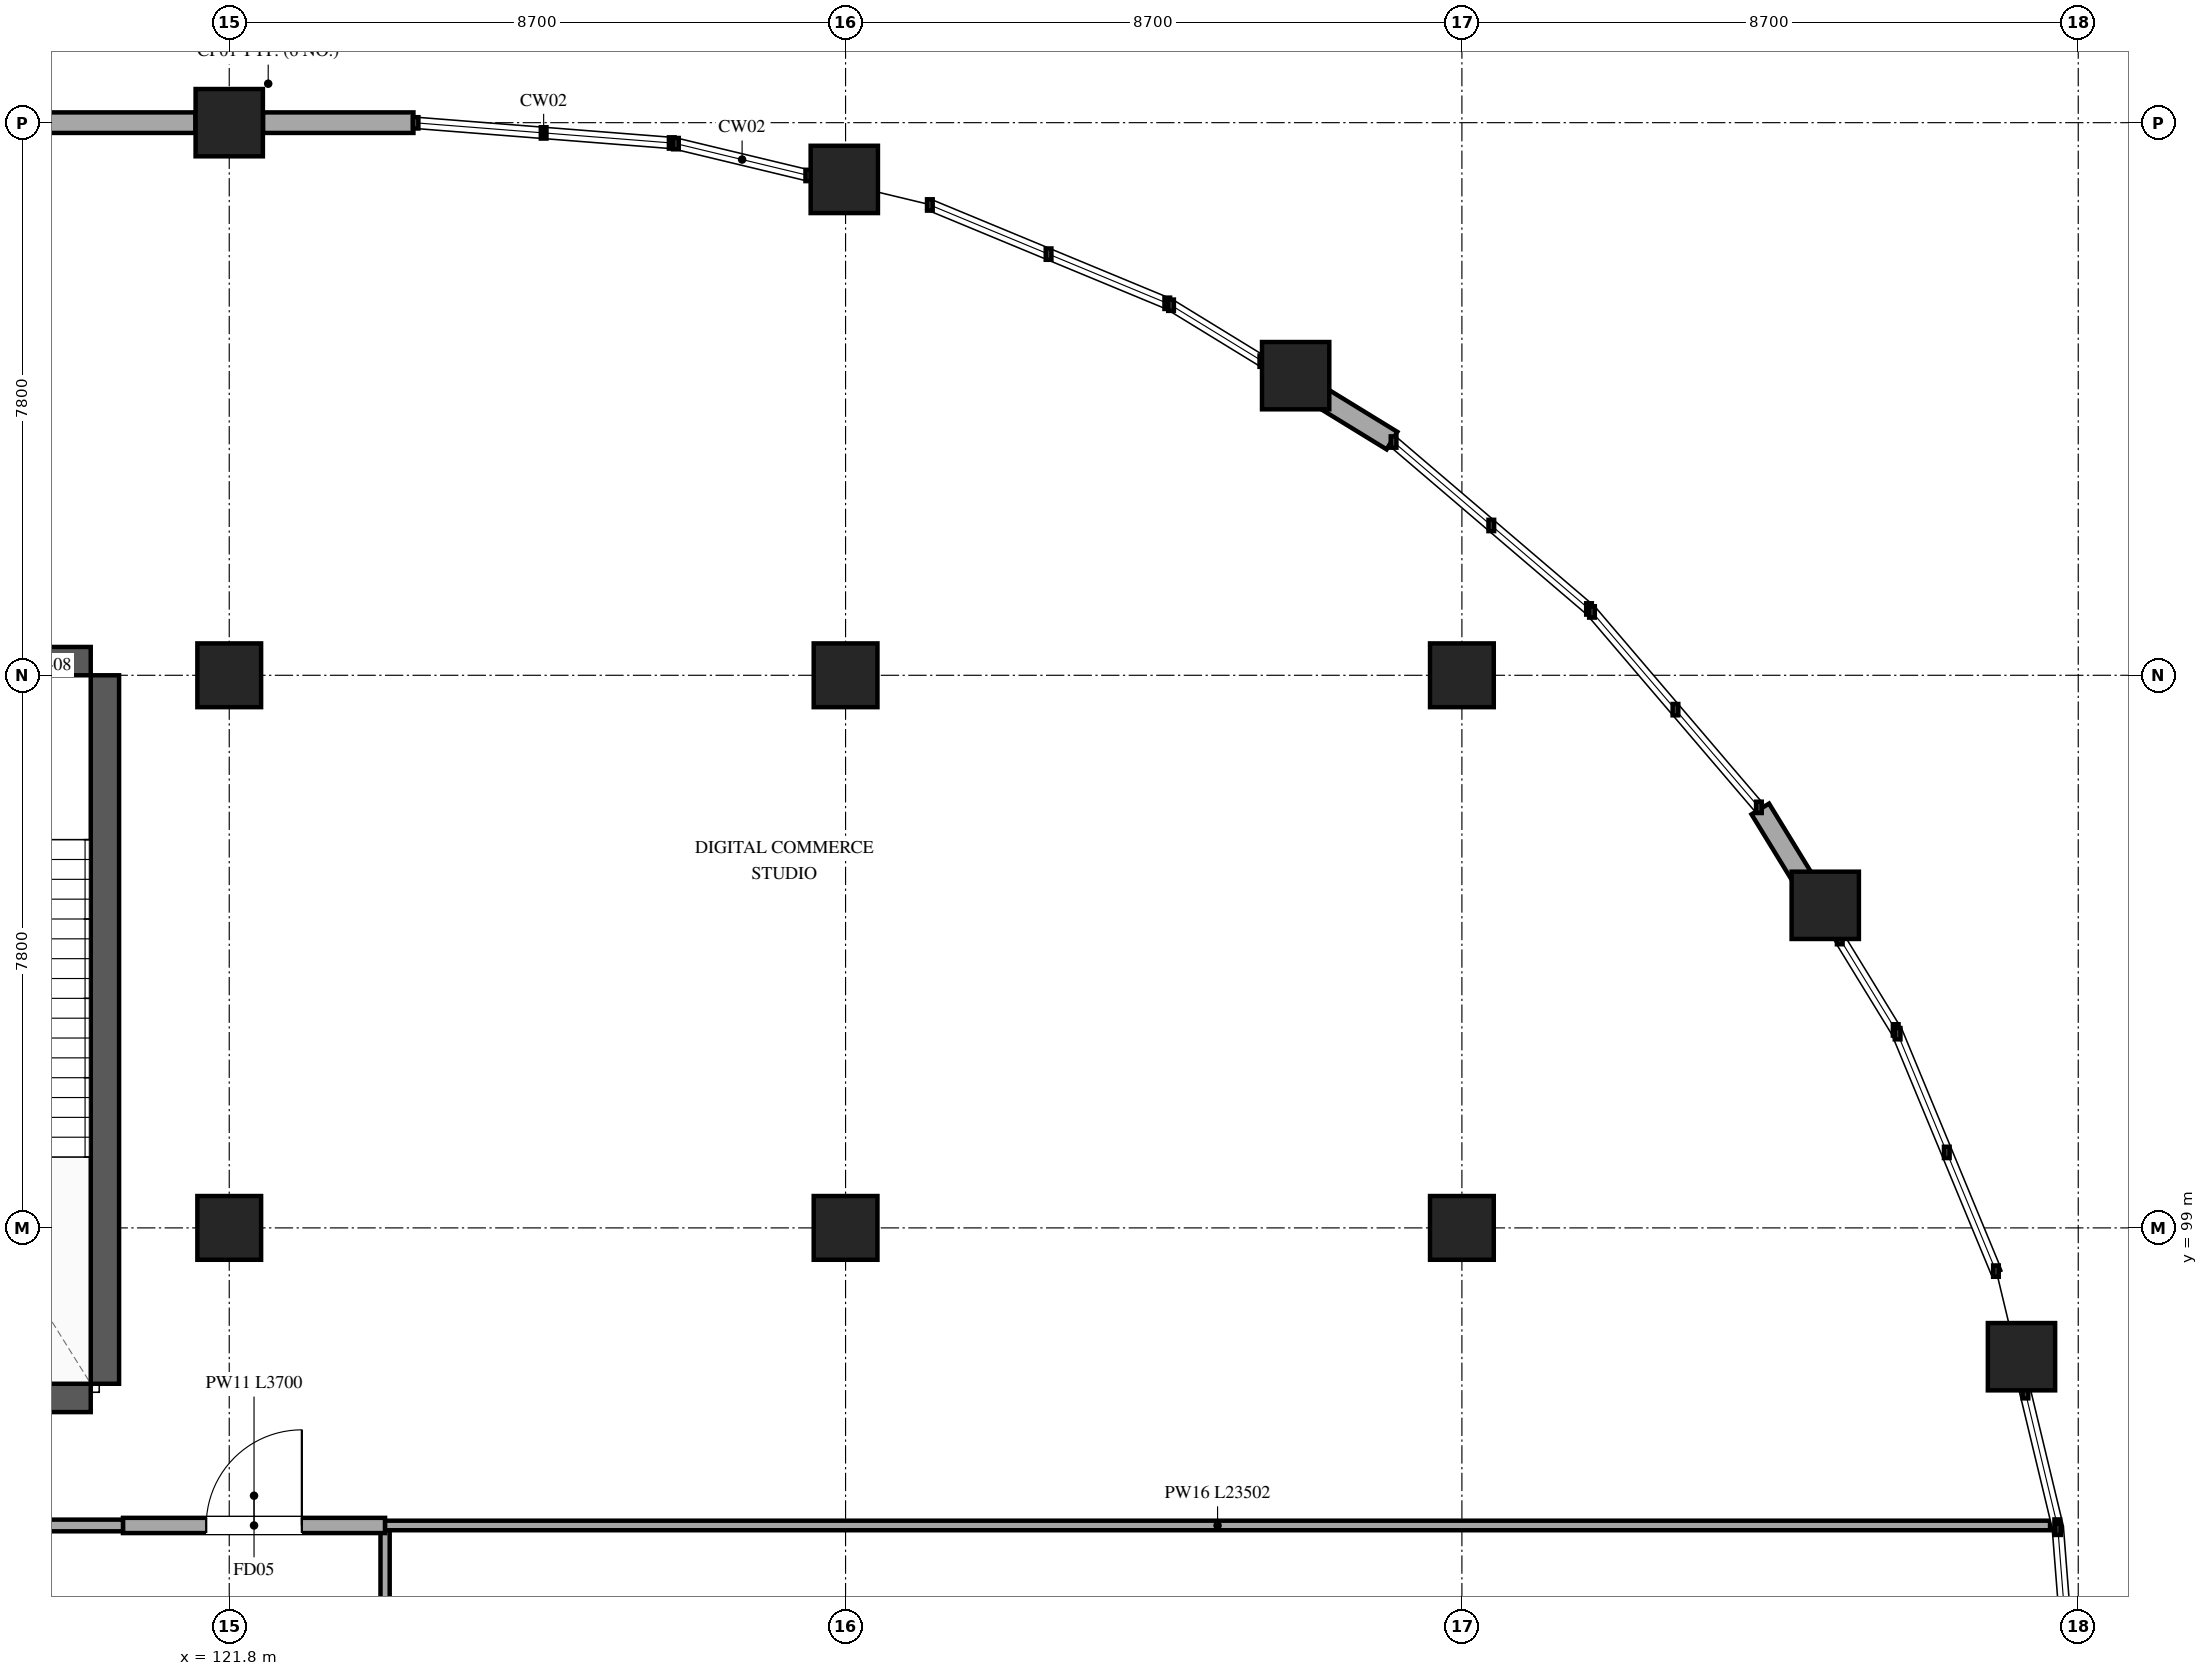
"""IFC4 building model, lengths in metres.
Left out: names, types, materials, properties, quantities, classifications, styles, units other than length and angle.
Written with IfcOpenShell. Run it as: python <this file> out.ifc"""

import sys

from ifc_helpers import new_model, si_unit, direction, frame, frame_2d, origin, origin_2d, place, context, subcontext, project, spatial, rectangle, circle, extrude, element, fill, save


model = new_model("IFC4")
c1 = context("Model", 3, precision=1e-05, world=origin(), true_north=direction((0.0, 1.0)))
c2 = subcontext(c1, "Body", "Model", "MODEL_VIEW")
j1 = project(units=[si_unit("LENGTHUNIT", "METRE"), si_unit("PLANEANGLEUNIT", "RADIAN")], contexts=[c1])
p1 = place(None, origin())
s1 = spatial("IfcSite", under=j1, at=p1, CompositionType="ELEMENT")
p2 = place(p1, origin())
s2 = spatial("IfcBuilding", under=s1, at=p2, CompositionType="ELEMENT")
p3 = place(p2, frame((0.0, 0.0, 11.4)))
s3 = spatial("IfcBuildingStorey", under=s2, at=p3, CompositionType="ELEMENT", Elevation=11.4)
for number, where, z_axis, x_axis in (
    (1, (121.8, 99.0, 0.0), (0.0, 0.0, 1.0), (1.0, 0.0, 0.0)),
    (2, (121.8, 106.8, 0.0), (0.0, 0.0, 1.0), (1.0, 0.0, 0.0)),
):
    element("IfcColumn", number, at=place(p3, frame(where, z_axis=z_axis, x_axis=x_axis)), inside=s3, PredefinedType="COLUMN", context=c2, shape_type="SweptSolid", body=[
        extrude(rectangle(XDim=0.9, YDim=0.9, at=origin_2d()), origin(), (0.0, 0.0, 1.0), 5.1),
    ])
p4 = place(p3, frame((121.8, 114.6, 0.0), z_axis=(0.0, 0.0, 1.0), x_axis=(1.0, 0.0, 0.0)))
e3 = element("IfcColumn", 3, at=p4, inside=s3, PredefinedType="PILASTER", context=c2, shape_type="SweptSolid", body=[
    extrude(circle(Radius=0.475, at=origin_2d()), origin(), (0.0, 0.0, 1.0), 5.1),
])
for number, where, z_axis, x_axis in (
    (4, (130.5, 99.0, 0.0), (0.0, 0.0, 1.0), (1.0, 0.0, 0.0)),
    (5, (130.5, 106.8, 0.0), (0.0, 0.0, 1.0), (1.0, 0.0, 0.0)),
    (6, (139.2, 99.0, 0.0), (0.0, 0.0, 1.0), (1.0, 0.0, 0.0)),
    (7, (139.2, 106.8, 0.0), (0.0, 0.0, 1.0), (1.0, 0.0, 0.0)),
):
    element("IfcColumn", number, at=place(p3, frame(where, z_axis=z_axis, x_axis=x_axis)), inside=s3, PredefinedType="COLUMN", context=c2, shape_type="SweptSolid", body=[
        extrude(rectangle(XDim=0.9, YDim=0.9, at=origin_2d()), origin(), (0.0, 0.0, 1.0), 5.1),
    ])
for number, where, z_axis, x_axis in (
    (8, (147.099, 97.182, 0.0), (0.0, 0.0, 1.0), (1.0, 0.0, 0.0)),
    (9, (144.329, 103.553, 0.0), (0.0, 0.0, 1.0), (1.0, 0.0, 0.0)),
    (10, (136.853, 111.029, 0.0), (0.0, 0.0, 1.0), (1.0, 0.0, 0.0)),
    (11, (130.482, 113.799, 0.0), (0.0, 0.0, 1.0), (1.0, 0.0, 0.0)),
):
    element("IfcColumn", number, at=place(p3, frame(where, z_axis=z_axis, x_axis=x_axis)), inside=s3, PredefinedType="PILASTER", context=c2, shape_type="SweptSolid", body=[
        extrude(circle(Radius=0.475, at=origin_2d()), origin(), (0.0, 0.0, 1.0), 5.1),
    ])
p5 = place(p3, frame((113.577, 114.6, 0.0), z_axis=(0.0, 0.0, 1.0), x_axis=(1.0, 0.0, 0.0)))
e12 = element("IfcWall", 12, at=p5, inside=s3, PredefinedType="STANDARD", context=c2, shape_type="SweptSolid", body=[
    extrude(rectangle(XDim=7.746, YDim=0.29, at=frame_2d((3.873, 0.0))), origin(), (0.0, 0.0, 1.0), 4.055),
])
p6 = place(p5, frame((1.74, 0.0, 0.85)))
e13 = element("IfcOpeningElement", 13, at=p6, cuts=e12, PredefinedType="OPENING", context=c2, shape_type="SweptSolid", body=[
    extrude(rectangle(XDim=3.0, YDim=2.3, at=frame_2d((1.5, 1.15))), frame((0.0, 0.155, 0.0), z_axis=(0.0, -1.0, 0.0), x_axis=(1.0, 0.0, 0.0)), (0.0, 0.0, 1.0), 0.31),
])
p7 = place(p3, frame((122.277, 114.6, 0.0), z_axis=(0.0, 0.0, 1.0), x_axis=(1.0, 0.0, 0.0)))
e14 = element("IfcWall", 14, at=p7, inside=s3, PredefinedType="STANDARD", context=c2, shape_type="SweptSolid", body=[
    extrude(rectangle(XDim=2.123, YDim=0.29, at=frame_2d((1.062, 0.0))), origin(), (0.0, 0.0, 1.0), 4.155),
])
for number, where, z_axis, x_axis in (
    (15, (137.223, 110.719, 0.0), (0.0, 0.0, 1.0), (0.853, -0.523, 0.0)),
    (16, (143.412, 104.913, 0.0), (0.0, 0.0, 1.0), (0.523, -0.853, 0.0)),
):
    element("IfcWall", number, at=place(p3, frame(where, z_axis=z_axis, x_axis=x_axis)), inside=s3, PredefinedType="STANDARD", context=c2, shape_type="SweptSolid", body=[
        extrude(rectangle(XDim=1.161, YDim=0.29, at=frame_2d((0.581, 0.0))), origin(), (0.0, 0.0, 1.0), 4.155),
    ])
p8 = place(p3, frame((120.045, 106.8, 0.0), z_axis=(0.0, 0.0, 1.0), x_axis=(0.0, -1.0, 0.0)))
e17 = element("IfcWall", 17, at=p8, inside=s3, PredefinedType="SHEAR", context=c2, shape_type="SweptSolid", body=[
    extrude(rectangle(XDim=10.0, YDim=0.4, at=frame_2d((5.0, 0.0))), origin(), (0.0, 0.0, 1.0), 5.1),
])
for number, where, z_axis, x_axis in (
    (18, (119.845, 96.6, 0.0), (0.0, 0.0, 1.0), (-1.0, 0.0, 0.0)),
    (19, (115.055, 107.0, 0.0), (0.0, 0.0, 1.0), (1.0, 0.0, 0.0)),
):
    element("IfcWall", number, at=place(p3, frame(where, z_axis=z_axis, x_axis=x_axis)), inside=s3, PredefinedType="SHEAR", context=c2, shape_type="SweptSolid", body=[
        extrude(rectangle(XDim=4.79, YDim=0.4, at=frame_2d((2.395, 0.0))), origin(), (0.0, 0.0, 1.0), 5.1),
    ])
p9 = place(p3, frame((124.0, 94.8, 0.0), z_axis=(0.0, 0.0, 1.0), x_axis=(0.0, -1.0, 0.0)))
e20 = element("IfcWall", 20, at=p9, inside=s3, PredefinedType="PARTITIONING", context=c2, shape_type="SweptSolid", body=[
    extrude(rectangle(XDim=21.0, YDim=0.13, at=frame_2d((10.5, 0.0))), origin(), (0.0, 0.0, 1.0), 4.075),
])
p10 = place(p3, frame((120.3, 94.8, 0.0), z_axis=(0.0, 0.0, 1.0), x_axis=(1.0, 0.0, 0.0)))
e21 = element("IfcWall", 21, at=p10, inside=s3, PredefinedType="PARTITIONING", context=c2, shape_type="SweptSolid", body=[
    extrude(rectangle(XDim=3.7, YDim=0.215, at=frame_2d((1.85, 0.0))), origin(), (0.0, 0.0, 1.0), 4.075),
])
p11 = place(p10, frame((1.175, 0.0, 0.0)))
e22 = element("IfcOpeningElement", 22, at=p11, cuts=e21, PredefinedType="OPENING", context=c2, shape_type="SweptSolid", body=[
    extrude(rectangle(XDim=1.35, YDim=2.2, at=frame_2d((0.675, 1.1))), frame((0.0, 0.118, 0.0), z_axis=(0.0, -1.0, 0.0), x_axis=(1.0, 0.0, 0.0)), (0.0, 0.0, 1.0), 0.235),
])
p12 = place(p3, frame((114.655, 94.8, 0.0), z_axis=(0.0, 0.0, 1.0), x_axis=(1.0, 0.0, 0.0)))
e23 = element("IfcWall", 23, at=p12, inside=s3, PredefinedType="PARTITIONING", context=c2, shape_type="SweptSolid", body=[
    extrude(rectangle(XDim=5.645, YDim=0.165, at=frame_2d((2.823, 0.0))), origin(), (0.0, 0.0, 1.0), 4.76),
])
p13 = place(p3, frame((124.0, 94.8, 0.0), z_axis=(0.0, 0.0, 1.0), x_axis=(1.0, 0.0, 0.0)))
e24 = element("IfcWall", 24, at=p13, inside=s3, PredefinedType="PARTITIONING", context=c2, shape_type="SweptSolid", body=[
    extrude(rectangle(XDim=23.502, YDim=0.135, at=frame_2d((11.751, 0.0))), origin(), (0.0, 0.0, 1.0), 4.075),
])
p14 = place(p11, origin())
e25 = element("IfcDoor", 25, at=p14, inside=s3, OperationType="SINGLE_SWING_RIGHT", PredefinedType="DOOR", context=c2, shape_type="SweptSolid", body=[
    extrude(rectangle(XDim=1.35, YDim=2.2, at=frame_2d((0.675, 1.1))), frame((0.0, 0.025, 0.0), z_axis=(0.0, -1.0, 0.0), x_axis=(1.0, 0.0, 0.0)), (0.0, 0.0, 1.0), 0.05),
])
fill(e22, e25)
save(model, sys.argv[1])
